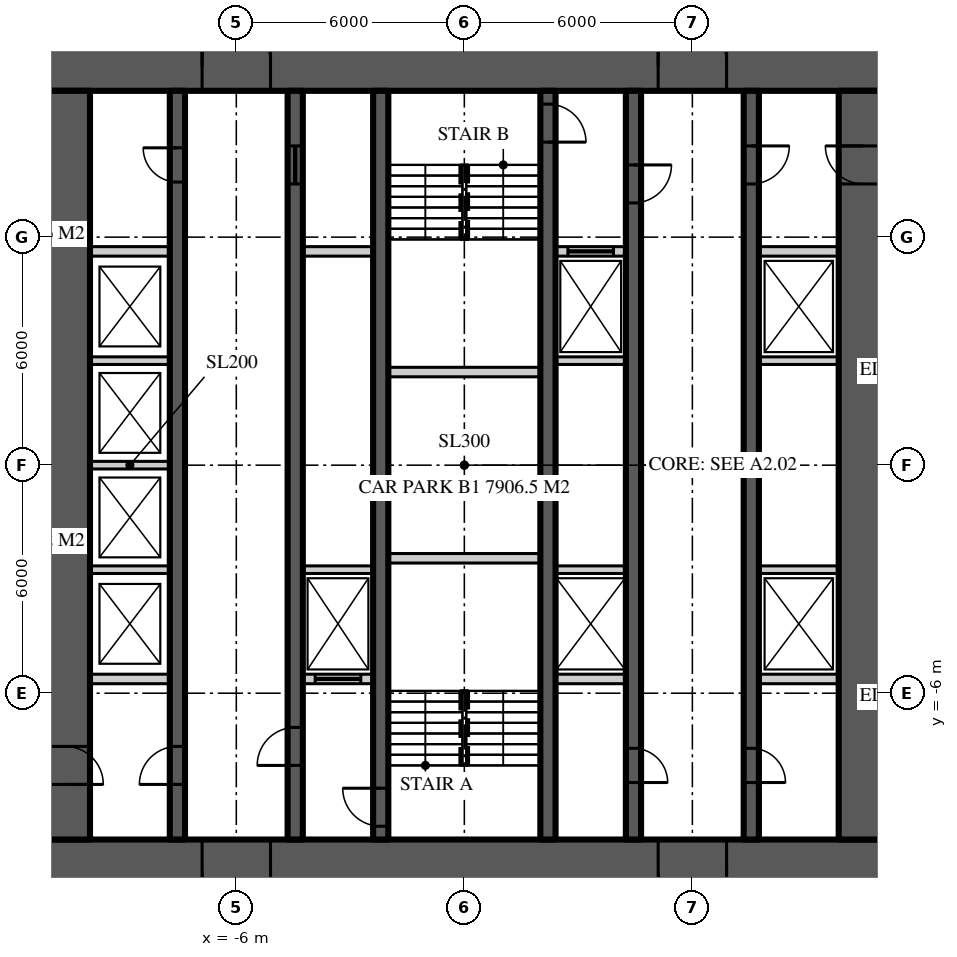
"""IFC4 building model, lengths in metres.
Left out: names, types, materials, properties, quantities, classifications, styles, units other than length and angle.
Written with IfcOpenShell. Run it as: python <this file> out.ifc"""

import sys

from ifc_helpers import new_model, si_unit, direction, frame, frame_2d, origin, place, context, subcontext, project, spatial, rectangle, extrude, element, fill, save


model = new_model("IFC4")
c1 = context("Model", 3, precision=1e-05, world=origin(), true_north=direction((0.0, 1.0)))
c2 = subcontext(c1, "Body", "Model", "MODEL_VIEW")
j1 = project(units=[si_unit("LENGTHUNIT", "METRE"), si_unit("PLANEANGLEUNIT", "RADIAN")], contexts=[c1])
p1 = place(None, origin())
s1 = spatial("IfcSite", under=j1, at=p1, CompositionType="ELEMENT")
p2 = place(p1, origin())
s2 = spatial("IfcBuilding", under=s1, at=p2, CompositionType="ELEMENT")
p3 = place(p2, frame((0.0, 0.0, -5.0)))
s3 = spatial("IfcBuildingStorey", under=s2, at=p3, CompositionType="ELEMENT", Elevation=-5.0)
p4 = place(p3, frame((-11.15, 10.5, 0.0), z_axis=(0.0, 0.0, 1.0), x_axis=(1.0, 0.0, 0.0)))
e1 = element("IfcWall", 1, at=p4, inside=s3, PredefinedType="SHEAR", context=c2, shape_type="SweptSolid", body=[
    extrude(rectangle(XDim=22.3, YDim=1.3, at=frame_2d((11.15, 0.0))), origin(), (0.0, 0.0, 1.0), 5.0),
])
p5 = place(p4, frame((4.25, 0.0, 0.0)))
e2 = element("IfcOpeningElement", 2, at=p5, cuts=e1, PredefinedType="OPENING", context=c2, shape_type="SweptSolid", body=[
    extrude(rectangle(XDim=1.8, YDim=2.2, at=frame_2d((0.9, 1.1))), frame((0.0, 0.66, 0.0), z_axis=(0.0, -1.0, 0.0), x_axis=(1.0, 0.0, 0.0)), (0.0, 0.0, 1.0), 1.32),
])
p6 = place(p4, frame((16.25, 0.0, 0.0)))
e3 = element("IfcOpeningElement", 3, at=p6, cuts=e1, PredefinedType="OPENING", context=c2, shape_type="SweptSolid", body=[
    extrude(rectangle(XDim=1.8, YDim=2.2, at=frame_2d((0.9, 1.1))), frame((0.0, 0.66, 0.0), z_axis=(0.0, -1.0, 0.0), x_axis=(1.0, 0.0, 0.0)), (0.0, 0.0, 1.0), 1.32),
])
p7 = place(p3, frame((11.15, -10.5, 0.0), z_axis=(0.0, 0.0, 1.0), x_axis=(-1.0, 0.0, 0.0)))
e4 = element("IfcWall", 4, at=p7, inside=s3, PredefinedType="SHEAR", context=c2, shape_type="SweptSolid", body=[
    extrude(rectangle(XDim=22.3, YDim=1.3, at=frame_2d((11.15, 0.0))), origin(), (0.0, 0.0, 1.0), 5.0),
])
p8 = place(p7, frame((16.25, 0.0, 0.0)))
e5 = element("IfcOpeningElement", 5, at=p8, cuts=e4, PredefinedType="OPENING", context=c2, shape_type="SweptSolid", body=[
    extrude(rectangle(XDim=1.8, YDim=2.2, at=frame_2d((0.9, 1.1))), frame((0.0, 0.66, 0.0), z_axis=(0.0, -1.0, 0.0), x_axis=(1.0, 0.0, 0.0)), (0.0, 0.0, 1.0), 1.32),
])
p9 = place(p7, frame((4.25, 0.0, 0.0)))
e6 = element("IfcOpeningElement", 6, at=p9, cuts=e4, PredefinedType="OPENING", context=c2, shape_type="SweptSolid", body=[
    extrude(rectangle(XDim=1.8, YDim=2.2, at=frame_2d((0.9, 1.1))), frame((0.0, 0.66, 0.0), z_axis=(0.0, -1.0, 0.0), x_axis=(1.0, 0.0, 0.0)), (0.0, 0.0, 1.0), 1.32),
])
p10 = place(p3, frame((10.5, -9.85, 0.0), z_axis=(0.0, 0.0, 1.0), x_axis=(0.0, 1.0, 0.0)))
e7 = element("IfcWall", 7, at=p10, inside=s3, PredefinedType="SHEAR", context=c2, shape_type="SweptSolid", body=[
    extrude(rectangle(XDim=19.7, YDim=1.3, at=frame_2d((9.85, 0.0))), origin(), (0.0, 0.0, 1.0), 5.0),
])
p11 = place(p10, frame((17.25, 0.0, 0.0)))
e8 = element("IfcOpeningElement", 8, at=p11, cuts=e7, PredefinedType="OPENING", context=c2, shape_type="SweptSolid", body=[
    extrude(rectangle(XDim=1.0, YDim=2.2, at=frame_2d((0.5, 1.1))), frame((0.0, 0.66, 0.0), z_axis=(0.0, -1.0, 0.0), x_axis=(1.0, 0.0, 0.0)), (0.0, 0.0, 1.0), 1.32),
])
p12 = place(p3, frame((-10.5, 9.85, 0.0), z_axis=(0.0, 0.0, 1.0), x_axis=(0.0, -1.0, 0.0)))
e9 = element("IfcWall", 9, at=p12, inside=s3, PredefinedType="SHEAR", context=c2, shape_type="SweptSolid", body=[
    extrude(rectangle(XDim=19.7, YDim=1.3, at=frame_2d((9.85, 0.0))), origin(), (0.0, 0.0, 1.0), 5.0),
])
p13 = place(p12, frame((17.25, 0.0, 0.0)))
e10 = element("IfcOpeningElement", 10, at=p13, cuts=e9, PredefinedType="OPENING", context=c2, shape_type="SweptSolid", body=[
    extrude(rectangle(XDim=1.0, YDim=2.2, at=frame_2d((0.5, 1.1))), frame((0.0, 0.66, 0.0), z_axis=(0.0, -1.0, 0.0), x_axis=(1.0, 0.0, 0.0)), (0.0, 0.0, 1.0), 1.32),
])
p14 = place(p3, frame((-7.55, -9.85, 0.0), z_axis=(0.0, 0.0, 1.0), x_axis=(0.0, 1.0, 0.0)))
e11 = element("IfcWall", 11, at=p14, inside=s3, PredefinedType="SHEAR", context=c2, shape_type="SweptSolid", body=[
    extrude(rectangle(XDim=19.7, YDim=0.4, at=frame_2d((9.85, 0.0))), origin(), (0.0, 0.0, 1.0), 5.0),
])
p15 = place(p14, frame((1.45, 0.0, 0.0)))
e12 = element("IfcOpeningElement", 12, at=p15, cuts=e11, PredefinedType="OPENING", context=c2, shape_type="SweptSolid", body=[
    extrude(rectangle(XDim=1.0, YDim=2.2, at=frame_2d((0.5, 1.1))), frame((0.0, 0.21, 0.0), z_axis=(0.0, -1.0, 0.0), x_axis=(1.0, 0.0, 0.0)), (0.0, 0.0, 1.0), 0.42),
])
p16 = place(p14, frame((17.3, 0.0, 0.0)))
e13 = element("IfcOpeningElement", 13, at=p16, cuts=e11, PredefinedType="OPENING", context=c2, shape_type="SweptSolid", body=[
    extrude(rectangle(XDim=0.9, YDim=2.1, at=frame_2d((0.45, 1.05))), frame((0.0, 0.21, 0.0), z_axis=(0.0, -1.0, 0.0), x_axis=(1.0, 0.0, 0.0)), (0.0, 0.0, 1.0), 0.42),
])
p17 = place(p3, frame((7.55, 9.85, 0.0), z_axis=(0.0, 0.0, 1.0), x_axis=(0.0, -1.0, 0.0)))
e14 = element("IfcWall", 14, at=p17, inside=s3, PredefinedType="SHEAR", context=c2, shape_type="SweptSolid", body=[
    extrude(rectangle(XDim=19.7, YDim=0.4, at=frame_2d((9.85, 0.0))), origin(), (0.0, 0.0, 1.0), 5.0),
])
p18 = place(p17, frame((1.45, 0.0, 0.0)))
e15 = element("IfcOpeningElement", 15, at=p18, cuts=e14, PredefinedType="OPENING", context=c2, shape_type="SweptSolid", body=[
    extrude(rectangle(XDim=1.0, YDim=2.2, at=frame_2d((0.5, 1.1))), frame((0.0, 0.21, 0.0), z_axis=(0.0, -1.0, 0.0), x_axis=(1.0, 0.0, 0.0)), (0.0, 0.0, 1.0), 0.42),
])
p19 = place(p17, frame((17.3, 0.0, 0.0)))
e16 = element("IfcOpeningElement", 16, at=p19, cuts=e14, PredefinedType="OPENING", context=c2, shape_type="SweptSolid", body=[
    extrude(rectangle(XDim=0.9, YDim=2.1, at=frame_2d((0.45, 1.05))), frame((0.0, 0.21, 0.0), z_axis=(0.0, -1.0, 0.0), x_axis=(1.0, 0.0, 0.0)), (0.0, 0.0, 1.0), 0.42),
])
p20 = place(p3, frame((-4.45, -9.85, 0.0), z_axis=(0.0, 0.0, 1.0), x_axis=(0.0, 1.0, 0.0)))
e17 = element("IfcWall", 17, at=p20, inside=s3, PredefinedType="SHEAR", context=c2, shape_type="SweptSolid", body=[
    extrude(rectangle(XDim=19.7, YDim=0.4, at=frame_2d((9.85, 0.0))), origin(), (0.0, 0.0, 1.0), 5.0),
])
p21 = place(p20, frame((1.95, 0.0, 0.0)))
e18 = element("IfcOpeningElement", 18, at=p21, cuts=e17, PredefinedType="OPENING", context=c2, shape_type="SweptSolid", body=[
    extrude(rectangle(XDim=1.0, YDim=2.2, at=frame_2d((0.5, 1.1))), frame((0.0, 0.21, 0.0), z_axis=(0.0, -1.0, 0.0), x_axis=(1.0, 0.0, 0.0)), (0.0, 0.0, 1.0), 0.42),
])
p22 = place(p20, frame((17.25, 0.0, 0.0)))
e19 = element("IfcOpeningElement", 19, at=p22, cuts=e17, PredefinedType="OPENING", context=c2, shape_type="SweptSolid", body=[
    extrude(rectangle(XDim=1.0, YDim=2.1, at=frame_2d((0.5, 1.05))), frame((0.0, 0.21, 0.0), z_axis=(0.0, -1.0, 0.0), x_axis=(1.0, 0.0, 0.0)), (0.0, 0.0, 1.0), 0.42),
])
p23 = place(p3, frame((4.45, 9.85, 0.0), z_axis=(0.0, 0.0, 1.0), x_axis=(0.0, -1.0, 0.0)))
e20 = element("IfcWall", 20, at=p23, inside=s3, PredefinedType="SHEAR", context=c2, shape_type="SweptSolid", body=[
    extrude(rectangle(XDim=19.7, YDim=0.4, at=frame_2d((9.85, 0.0))), origin(), (0.0, 0.0, 1.0), 5.0),
])
p24 = place(p23, frame((1.95, 0.0, 0.0)))
e21 = element("IfcOpeningElement", 21, at=p24, cuts=e20, PredefinedType="OPENING", context=c2, shape_type="SweptSolid", body=[
    extrude(rectangle(XDim=1.0, YDim=2.2, at=frame_2d((0.5, 1.1))), frame((0.0, 0.21, 0.0), z_axis=(0.0, -1.0, 0.0), x_axis=(1.0, 0.0, 0.0)), (0.0, 0.0, 1.0), 0.42),
])
p25 = place(p23, frame((17.3, 0.0, 0.0)))
e22 = element("IfcOpeningElement", 22, at=p25, cuts=e20, PredefinedType="OPENING", context=c2, shape_type="SweptSolid", body=[
    extrude(rectangle(XDim=0.9, YDim=2.1, at=frame_2d((0.45, 1.05))), frame((0.0, 0.21, 0.0), z_axis=(0.0, -1.0, 0.0), x_axis=(1.0, 0.0, 0.0)), (0.0, 0.0, 1.0), 0.42),
])
p26 = place(p3, frame((-2.2, -9.85, 0.0), z_axis=(0.0, 0.0, 1.0), x_axis=(0.0, 1.0, 0.0)))
e23 = element("IfcWall", 23, at=p26, inside=s3, PredefinedType="SHEAR", context=c2, shape_type="SweptSolid", body=[
    extrude(rectangle(XDim=19.7, YDim=0.4, at=frame_2d((9.85, 0.0))), origin(), (0.0, 0.0, 1.0), 5.0),
])
p27 = place(p26, frame((0.35, 0.0, 0.0)))
e24 = element("IfcOpeningElement", 24, at=p27, cuts=e23, PredefinedType="OPENING", context=c2, shape_type="SweptSolid", body=[
    extrude(rectangle(XDim=1.0, YDim=2.2, at=frame_2d((0.5, 1.1))), frame((0.0, 0.21, 0.0), z_axis=(0.0, -1.0, 0.0), x_axis=(1.0, 0.0, 0.0)), (0.0, 0.0, 1.0), 0.42),
])
p28 = place(p3, frame((2.2, 9.85, 0.0), z_axis=(0.0, 0.0, 1.0), x_axis=(0.0, -1.0, 0.0)))
e25 = element("IfcWall", 25, at=p28, inside=s3, PredefinedType="SHEAR", context=c2, shape_type="SweptSolid", body=[
    extrude(rectangle(XDim=19.7, YDim=0.4, at=frame_2d((9.85, 0.0))), origin(), (0.0, 0.0, 1.0), 5.0),
])
p29 = place(p28, frame((0.35, 0.0, 0.0)))
e26 = element("IfcOpeningElement", 26, at=p29, cuts=e25, PredefinedType="OPENING", context=c2, shape_type="SweptSolid", body=[
    extrude(rectangle(XDim=1.0, YDim=2.2, at=frame_2d((0.5, 1.1))), frame((0.0, 0.21, 0.0), z_axis=(0.0, -1.0, 0.0), x_axis=(1.0, 0.0, 0.0)), (0.0, 0.0, 1.0), 0.42),
])
p30 = place(p3, frame((-9.85, 5.625, 0.0), z_axis=(0.0, 0.0, 1.0), x_axis=(1.0, 0.0, 0.0)))
e27 = element("IfcWall", 27, at=p30, inside=s3, PredefinedType="SOLIDWALL", context=c2, shape_type="SweptSolid", body=[
    extrude(rectangle(XDim=2.1, YDim=0.25, at=frame_2d((1.05, 0.0))), origin(), (0.0, 0.0, 1.0), 4.8),
])
p31 = place(p3, frame((-4.25, 5.625, 0.0), z_axis=(0.0, 0.0, 1.0), x_axis=(1.0, 0.0, 0.0)))
e28 = element("IfcWall", 28, at=p31, inside=s3, PredefinedType="SOLIDWALL", context=c2, shape_type="SweptSolid", body=[
    extrude(rectangle(XDim=1.85, YDim=0.25, at=frame_2d((0.925, 0.0))), origin(), (0.0, 0.0, 1.0), 4.8),
])
p32 = place(p3, frame((2.4, 5.625, 0.0), z_axis=(0.0, 0.0, 1.0), x_axis=(1.0, 0.0, 0.0)))
e29 = element("IfcWall", 29, at=p32, inside=s3, PredefinedType="SOLIDWALL", context=c2, shape_type="SweptSolid", body=[
    extrude(rectangle(XDim=1.85, YDim=0.25, at=frame_2d((0.925, 0.0))), origin(), (0.0, 0.0, 1.0), 4.8),
])
p33 = place(p32, frame((0.325, 0.0, 0.0)))
e30 = element("IfcOpeningElement", 30, at=p33, cuts=e29, PredefinedType="OPENING", context=c2, shape_type="SweptSolid", body=[
    extrude(rectangle(XDim=1.2, YDim=2.2, at=frame_2d((0.6, 1.1))), frame((0.0, 0.135, 0.0), z_axis=(0.0, -1.0, 0.0), x_axis=(1.0, 0.0, 0.0)), (0.0, 0.0, 1.0), 0.27),
])
for number, where, z_axis, x_axis in (
    (31, (7.75, 5.625, 0.0), (0.0, 0.0, 1.0), (1.0, 0.0, 0.0)),
    (32, (-9.85, -5.625, 0.0), (0.0, 0.0, 1.0), (1.0, 0.0, 0.0)),
):
    element("IfcWall", number, at=place(p3, frame(where, z_axis=z_axis, x_axis=x_axis)), inside=s3, PredefinedType="SOLIDWALL", context=c2, shape_type="SweptSolid", body=[
        extrude(rectangle(XDim=2.1, YDim=0.25, at=frame_2d((1.05, 0.0))), origin(), (0.0, 0.0, 1.0), 4.8),
    ])
p34 = place(p3, frame((-4.25, -5.625, 0.0), z_axis=(0.0, 0.0, 1.0), x_axis=(1.0, 0.0, 0.0)))
e33 = element("IfcWall", 33, at=p34, inside=s3, PredefinedType="SOLIDWALL", context=c2, shape_type="SweptSolid", body=[
    extrude(rectangle(XDim=1.85, YDim=0.25, at=frame_2d((0.925, 0.0))), origin(), (0.0, 0.0, 1.0), 4.8),
])
p35 = place(p34, frame((0.325, 0.0, 0.0)))
e34 = element("IfcOpeningElement", 34, at=p35, cuts=e33, PredefinedType="OPENING", context=c2, shape_type="SweptSolid", body=[
    extrude(rectangle(XDim=1.2, YDim=2.2, at=frame_2d((0.6, 1.1))), frame((0.0, 0.135, 0.0), z_axis=(0.0, -1.0, 0.0), x_axis=(1.0, 0.0, 0.0)), (0.0, 0.0, 1.0), 0.27),
])
p36 = place(p3, frame((2.4, -5.625, 0.0), z_axis=(0.0, 0.0, 1.0), x_axis=(1.0, 0.0, 0.0)))
e35 = element("IfcWall", 35, at=p36, inside=s3, PredefinedType="SOLIDWALL", context=c2, shape_type="SweptSolid", body=[
    extrude(rectangle(XDim=1.85, YDim=0.25, at=frame_2d((0.925, 0.0))), origin(), (0.0, 0.0, 1.0), 4.8),
])
p37 = place(p3, frame((7.75, -5.625, 0.0), z_axis=(0.0, 0.0, 1.0), x_axis=(1.0, 0.0, 0.0)))
e36 = element("IfcWall", 36, at=p37, inside=s3, PredefinedType="SOLIDWALL", context=c2, shape_type="SweptSolid", body=[
    extrude(rectangle(XDim=2.1, YDim=0.25, at=frame_2d((1.05, 0.0))), origin(), (0.0, 0.0, 1.0), 4.8),
])
for number, where, z_axis, x_axis in (
    (37, (-2.0, -2.45, 0.0), (0.0, 0.0, 1.0), (1.0, 0.0, 0.0)),
    (38, (-2.0, 2.45, 0.0), (0.0, 0.0, 1.0), (1.0, 0.0, 0.0)),
):
    element("IfcWall", number, at=place(p3, frame(where, z_axis=z_axis, x_axis=x_axis)), inside=s3, PredefinedType="SOLIDWALL", context=c2, shape_type="SweptSolid", body=[
        extrude(rectangle(XDim=4.0, YDim=0.25, at=frame_2d((2.0, 0.0))), origin(), (0.0, 0.0, 1.0), 4.8),
    ])
p38 = place(p3, frame((-9.85, -2.75, 0.0), z_axis=(0.0, 0.0, 1.0), x_axis=(1.0, 0.0, 0.0)))
e39 = element("IfcWall", 39, at=p38, inside=s3, PredefinedType="SOLIDWALL", context=c2, shape_type="SweptSolid", body=[
    extrude(rectangle(XDim=2.1, YDim=0.2, at=frame_2d((1.05, 0.0))), origin(), (0.0, 0.0, 1.0), 4.8),
])
for number, where, z_axis, x_axis in (
    (40, (-4.25, -2.75, 0.0), (0.0, 0.0, 1.0), (1.0, 0.0, 0.0)),
    (41, (2.4, -2.75, 0.0), (0.0, 0.0, 1.0), (1.0, 0.0, 0.0)),
):
    element("IfcWall", number, at=place(p3, frame(where, z_axis=z_axis, x_axis=x_axis)), inside=s3, PredefinedType="SOLIDWALL", context=c2, shape_type="SweptSolid", body=[
        extrude(rectangle(XDim=1.85, YDim=0.2, at=frame_2d((0.925, 0.0))), origin(), (0.0, 0.0, 1.0), 4.8),
    ])
for number, where, z_axis, x_axis in (
    (42, (7.75, -2.75, 0.0), (0.0, 0.0, 1.0), (1.0, 0.0, 0.0)),
    (43, (-9.85, 0.0, 0.0), (0.0, 0.0, 1.0), (1.0, 0.0, 0.0)),
    (44, (-9.85, 2.75, 0.0), (0.0, 0.0, 1.0), (1.0, 0.0, 0.0)),
):
    element("IfcWall", number, at=place(p3, frame(where, z_axis=z_axis, x_axis=x_axis)), inside=s3, PredefinedType="SOLIDWALL", context=c2, shape_type="SweptSolid", body=[
        extrude(rectangle(XDim=2.1, YDim=0.2, at=frame_2d((1.05, 0.0))), origin(), (0.0, 0.0, 1.0), 4.8),
    ])
p39 = place(p3, frame((2.4, 2.75, 0.0), z_axis=(0.0, 0.0, 1.0), x_axis=(1.0, 0.0, 0.0)))
e45 = element("IfcWall", 45, at=p39, inside=s3, PredefinedType="SOLIDWALL", context=c2, shape_type="SweptSolid", body=[
    extrude(rectangle(XDim=1.85, YDim=0.2, at=frame_2d((0.925, 0.0))), origin(), (0.0, 0.0, 1.0), 4.8),
])
p40 = place(p3, frame((7.75, 2.75, 0.0), z_axis=(0.0, 0.0, 1.0), x_axis=(1.0, 0.0, 0.0)))
e46 = element("IfcWall", 46, at=p40, inside=s3, PredefinedType="SOLIDWALL", context=c2, shape_type="SweptSolid", body=[
    extrude(rectangle(XDim=2.1, YDim=0.2, at=frame_2d((1.05, 0.0))), origin(), (0.0, 0.0, 1.0), 4.8),
])
p41 = place(p5, origin())
e47 = element("IfcDoor", 47, at=p41, inside=s3, OperationType="DOUBLE_DOOR_DOUBLE_SWING", PredefinedType="DOOR", context=c2, shape_type="SweptSolid", body=[
    extrude(rectangle(XDim=1.8, YDim=2.2, at=frame_2d((0.9, 1.1))), frame((0.0, 0.025, 0.0), z_axis=(0.0, -1.0, 0.0), x_axis=(1.0, 0.0, 0.0)), (0.0, 0.0, 1.0), 0.05),
])
fill(e2, e47)
p42 = place(p8, origin())
e48 = element("IfcDoor", 48, at=p42, inside=s3, OperationType="DOUBLE_DOOR_DOUBLE_SWING", PredefinedType="DOOR", context=c2, shape_type="SweptSolid", body=[
    extrude(rectangle(XDim=1.8, YDim=2.2, at=frame_2d((0.9, 1.1))), frame((0.0, 0.025, 0.0), z_axis=(0.0, -1.0, 0.0), x_axis=(1.0, 0.0, 0.0)), (0.0, 0.0, 1.0), 0.05),
])
fill(e5, e48)
p43 = place(p6, origin())
e49 = element("IfcDoor", 49, at=p43, inside=s3, OperationType="DOUBLE_DOOR_DOUBLE_SWING", PredefinedType="DOOR", context=c2, shape_type="SweptSolid", body=[
    extrude(rectangle(XDim=1.8, YDim=2.2, at=frame_2d((0.9, 1.1))), frame((0.0, 0.025, 0.0), z_axis=(0.0, -1.0, 0.0), x_axis=(1.0, 0.0, 0.0)), (0.0, 0.0, 1.0), 0.05),
])
fill(e3, e49)
p44 = place(p9, origin())
e50 = element("IfcDoor", 50, at=p44, inside=s3, OperationType="DOUBLE_DOOR_DOUBLE_SWING", PredefinedType="DOOR", context=c2, shape_type="SweptSolid", body=[
    extrude(rectangle(XDim=1.8, YDim=2.2, at=frame_2d((0.9, 1.1))), frame((0.0, 0.025, 0.0), z_axis=(0.0, -1.0, 0.0), x_axis=(1.0, 0.0, 0.0)), (0.0, 0.0, 1.0), 0.05),
])
fill(e6, e50)
p45 = place(p15, origin())
e51 = element("IfcDoor", 51, at=p45, inside=s3, OperationType="SINGLE_SWING_LEFT", PredefinedType="DOOR", context=c2, shape_type="SweptSolid", body=[
    extrude(rectangle(XDim=1.0, YDim=2.2, at=frame_2d((0.5, 1.1))), frame((0.0, 0.025, 0.0), z_axis=(0.0, -1.0, 0.0), x_axis=(1.0, 0.0, 0.0)), (0.0, 0.0, 1.0), 0.05),
])
fill(e12, e51)
p46 = place(p13, origin())
e52 = element("IfcDoor", 52, at=p46, inside=s3, OperationType="SINGLE_SWING_RIGHT", PredefinedType="DOOR", context=c2, shape_type="SweptSolid", body=[
    extrude(rectangle(XDim=1.0, YDim=2.2, at=frame_2d((0.5, 1.1))), frame((0.0, 0.025, 0.0), z_axis=(0.0, -1.0, 0.0), x_axis=(1.0, 0.0, 0.0)), (0.0, 0.0, 1.0), 0.05),
])
fill(e10, e52)
p47 = place(p18, origin())
e53 = element("IfcDoor", 53, at=p47, inside=s3, OperationType="SINGLE_SWING_LEFT", PredefinedType="DOOR", context=c2, shape_type="SweptSolid", body=[
    extrude(rectangle(XDim=1.0, YDim=2.2, at=frame_2d((0.5, 1.1))), frame((0.0, 0.025, 0.0), z_axis=(0.0, -1.0, 0.0), x_axis=(1.0, 0.0, 0.0)), (0.0, 0.0, 1.0), 0.05),
])
fill(e15, e53)
p48 = place(p11, origin())
e54 = element("IfcDoor", 54, at=p48, inside=s3, OperationType="SINGLE_SWING_RIGHT", PredefinedType="DOOR", context=c2, shape_type="SweptSolid", body=[
    extrude(rectangle(XDim=1.0, YDim=2.2, at=frame_2d((0.5, 1.1))), frame((0.0, 0.025, 0.0), z_axis=(0.0, -1.0, 0.0), x_axis=(1.0, 0.0, 0.0)), (0.0, 0.0, 1.0), 0.05),
])
fill(e8, e54)
p49 = place(p21, origin())
e55 = element("IfcDoor", 55, at=p49, inside=s3, OperationType="SINGLE_SWING_LEFT", PredefinedType="DOOR", context=c2, shape_type="SweptSolid", body=[
    extrude(rectangle(XDim=1.0, YDim=2.2, at=frame_2d((0.5, 1.1))), frame((0.0, 0.025, 0.0), z_axis=(0.0, -1.0, 0.0), x_axis=(1.0, 0.0, 0.0)), (0.0, 0.0, 1.0), 0.05),
])
fill(e18, e55)
p50 = place(p27, origin())
e56 = element("IfcDoor", 56, at=p50, inside=s3, OperationType="SINGLE_SWING_RIGHT", PredefinedType="DOOR", context=c2, shape_type="SweptSolid", body=[
    extrude(rectangle(XDim=1.0, YDim=2.2, at=frame_2d((0.5, 1.1))), frame((0.0, 0.025, 0.0), z_axis=(0.0, -1.0, 0.0), x_axis=(1.0, 0.0, 0.0)), (0.0, 0.0, 1.0), 0.05),
])
fill(e24, e56)
p51 = place(p24, origin())
e57 = element("IfcDoor", 57, at=p51, inside=s3, OperationType="SINGLE_SWING_LEFT", PredefinedType="DOOR", context=c2, shape_type="SweptSolid", body=[
    extrude(rectangle(XDim=1.0, YDim=2.2, at=frame_2d((0.5, 1.1))), frame((0.0, 0.025, 0.0), z_axis=(0.0, -1.0, 0.0), x_axis=(1.0, 0.0, 0.0)), (0.0, 0.0, 1.0), 0.05),
])
fill(e21, e57)
p52 = place(p29, origin())
e58 = element("IfcDoor", 58, at=p52, inside=s3, OperationType="SINGLE_SWING_RIGHT", PredefinedType="DOOR", context=c2, shape_type="SweptSolid", body=[
    extrude(rectangle(XDim=1.0, YDim=2.2, at=frame_2d((0.5, 1.1))), frame((0.0, 0.025, 0.0), z_axis=(0.0, -1.0, 0.0), x_axis=(1.0, 0.0, 0.0)), (0.0, 0.0, 1.0), 0.05),
])
fill(e26, e58)
p53 = place(p16, origin())
e59 = element("IfcDoor", 59, at=p53, inside=s3, OperationType="SINGLE_SWING_RIGHT", PredefinedType="DOOR", context=c2, shape_type="SweptSolid", body=[
    extrude(rectangle(XDim=0.9, YDim=2.1, at=frame_2d((0.45, 1.05))), frame((0.0, 0.025, 0.0), z_axis=(0.0, -1.0, 0.0), x_axis=(1.0, 0.0, 0.0)), (0.0, 0.0, 1.0), 0.05),
])
fill(e13, e59)
p54 = place(p22, origin())
e60 = element("IfcDoor", 60, at=p54, inside=s3, OperationType="SLIDING_TO_LEFT", PredefinedType="DOOR", context=c2, shape_type="SweptSolid", body=[
    extrude(rectangle(XDim=1.0, YDim=2.1, at=frame_2d((0.5, 1.05))), frame((0.0, 0.025, 0.0), z_axis=(0.0, -1.0, 0.0), x_axis=(1.0, 0.0, 0.0)), (0.0, 0.0, 1.0), 0.05),
])
fill(e19, e60)
p55 = place(p19, origin())
e61 = element("IfcDoor", 61, at=p55, inside=s3, OperationType="SINGLE_SWING_RIGHT", PredefinedType="DOOR", context=c2, shape_type="SweptSolid", body=[
    extrude(rectangle(XDim=0.9, YDim=2.1, at=frame_2d((0.45, 1.05))), frame((0.0, 0.025, 0.0), z_axis=(0.0, -1.0, 0.0), x_axis=(1.0, 0.0, 0.0)), (0.0, 0.0, 1.0), 0.05),
])
fill(e16, e61)
p56 = place(p25, origin())
e62 = element("IfcDoor", 62, at=p56, inside=s3, OperationType="SINGLE_SWING_RIGHT", PredefinedType="DOOR", context=c2, shape_type="SweptSolid", body=[
    extrude(rectangle(XDim=0.9, YDim=2.1, at=frame_2d((0.45, 1.05))), frame((0.0, 0.025, 0.0), z_axis=(0.0, -1.0, 0.0), x_axis=(1.0, 0.0, 0.0)), (0.0, 0.0, 1.0), 0.05),
])
fill(e22, e62)
p57 = place(p35, origin())
e63 = element("IfcDoor", 63, at=p57, inside=s3, OperationType="SLIDING_TO_LEFT", PredefinedType="DOOR", context=c2, shape_type="SweptSolid", body=[
    extrude(rectangle(XDim=1.2, YDim=2.2, at=frame_2d((0.6, 1.1))), frame((0.0, 0.025, 0.0), z_axis=(0.0, -1.0, 0.0), x_axis=(1.0, 0.0, 0.0)), (0.0, 0.0, 1.0), 0.05),
])
fill(e34, e63)
p58 = place(p33, origin())
e64 = element("IfcDoor", 64, at=p58, inside=s3, OperationType="SLIDING_TO_LEFT", PredefinedType="DOOR", context=c2, shape_type="SweptSolid", body=[
    extrude(rectangle(XDim=1.2, YDim=2.2, at=frame_2d((0.6, 1.1))), frame((0.0, 0.025, 0.0), z_axis=(0.0, -1.0, 0.0), x_axis=(1.0, 0.0, 0.0)), (0.0, 0.0, 1.0), 0.05),
])
fill(e30, e64)
save(model, sys.argv[1])
